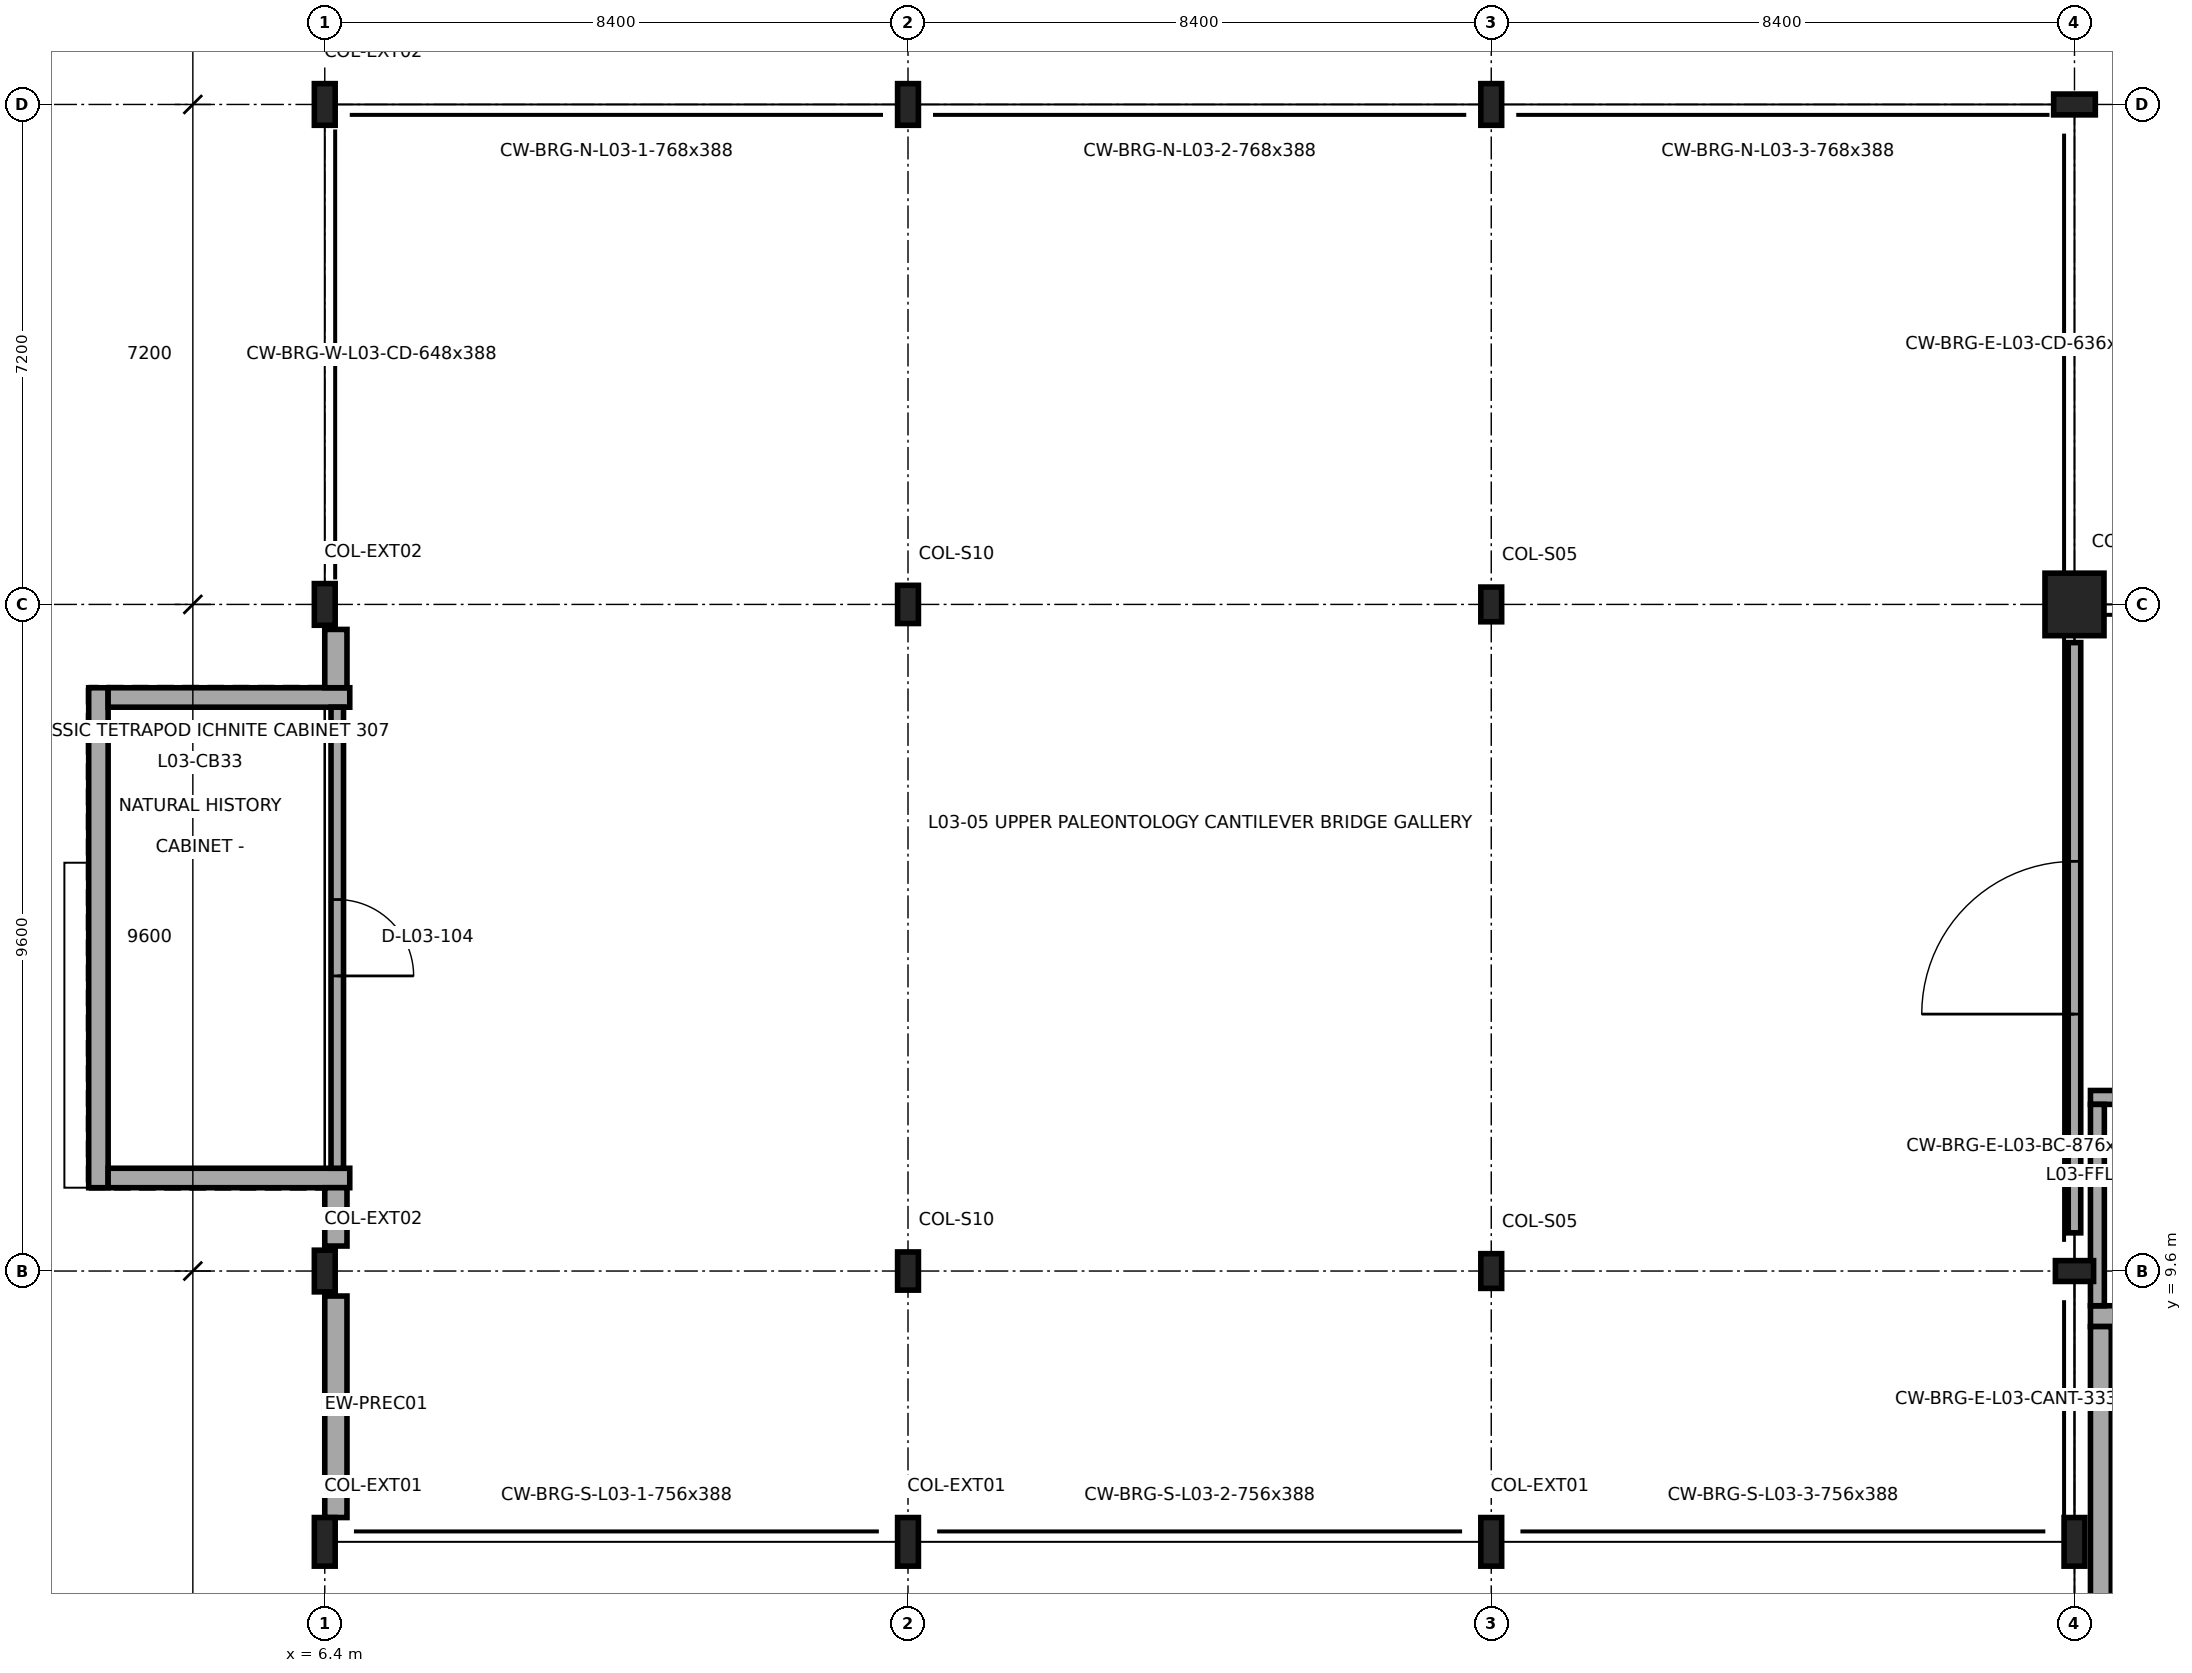
"""IFC4 building model, lengths in metres.
Left out: names, types, materials, properties, quantities, classifications, styles, units other than length and angle.
Written with IfcOpenShell. Run it as: python <this file> out.ifc"""

import sys

from ifc_helpers import new_model, si_unit, direction, frame, frame_2d, origin, origin_2d, place, context, subcontext, project, spatial, rectangle, i_section, extrude, element, fill, save


model = new_model("IFC4")
c1 = context("Model", 3, precision=1e-05, world=origin(), true_north=direction((0.0, 1.0)))
c2 = subcontext(c1, "Body", "Model", "MODEL_VIEW")
j1 = project(units=[si_unit("LENGTHUNIT", "METRE"), si_unit("PLANEANGLEUNIT", "RADIAN")], contexts=[c1])
p1 = place(None, origin())
s1 = spatial("IfcSite", under=j1, at=p1, CompositionType="ELEMENT")
p2 = place(p1, origin())
s2 = spatial("IfcBuilding", under=s1, at=p2, CompositionType="ELEMENT")
p3 = place(p2, frame((0.0, 0.0, 17.4)))
s3 = spatial("IfcBuildingStorey", under=s2, at=p3, CompositionType="ELEMENT", Elevation=17.4)
for number, where, z_axis, x_axis in (
    (1, (6.4, 9.6, 0.0), (0.0, 0.0, 1.0), (1.0, 0.0, 0.0)),
    (2, (6.4, 19.2, 0.0), (0.0, 0.0, 1.0), (1.0, 0.0, 0.0)),
    (3, (6.4, 26.4, 0.0), (0.0, 0.0, 1.0), (1.0, 0.0, 0.0)),
):
    element("IfcColumn", number, at=place(p3, frame(where, z_axis=z_axis, x_axis=x_axis)), inside=s3, PredefinedType="COLUMN", context=c2, shape_type="SweptSolid", body=[
        extrude(i_section(OverallWidth=0.3, OverallDepth=0.6, WebThickness=0.015, FlangeThickness=0.03, FilletRadius=0.027, at=origin_2d()), origin(), (0.0, 0.0, 1.0), 4.5),
    ])
for number, where, z_axis, x_axis in (
    (4, (14.8, 9.6, 0.0), (0.0, 0.0, 1.0), (1.0, 0.0, 0.0)),
    (5, (14.8, 19.2, 0.0), (0.0, 0.0, 1.0), (1.0, 0.0, 0.0)),
):
    element("IfcColumn", number, at=place(p3, frame(where, z_axis=z_axis, x_axis=x_axis)), inside=s3, PredefinedType="COLUMN", context=c2, shape_type="SweptSolid", body=[
        extrude(i_section(OverallWidth=0.3, OverallDepth=0.55, WebThickness=0.015, FlangeThickness=0.029, FilletRadius=0.027, at=origin_2d()), origin(), (0.0, 0.0, 1.0), 4.5),
    ])
p4 = place(p3, frame((14.8, 26.4, 0.0), z_axis=(0.0, 0.0, 1.0), x_axis=(1.0, 0.0, 0.0)))
e6 = element("IfcColumn", 6, at=p4, inside=s3, PredefinedType="COLUMN", context=c2, shape_type="SweptSolid", body=[
    extrude(i_section(OverallWidth=0.3, OverallDepth=0.6, WebThickness=0.015, FlangeThickness=0.03, FilletRadius=0.027, at=origin_2d()), origin(), (0.0, 0.0, 1.0), 4.5),
])
for number, where, z_axis, x_axis in (
    (7, (23.2, 9.6, 0.0), (0.0, 0.0, 1.0), (1.0, 0.0, 0.0)),
    (8, (23.2, 19.2, 0.0), (0.0, 0.0, 1.0), (1.0, 0.0, 0.0)),
):
    element("IfcColumn", number, at=place(p3, frame(where, z_axis=z_axis, x_axis=x_axis)), inside=s3, PredefinedType="COLUMN", context=c2, shape_type="SweptSolid", body=[
        extrude(i_section(OverallWidth=0.3, OverallDepth=0.5, WebThickness=0.014, FlangeThickness=0.028, FilletRadius=0.027, at=origin_2d()), origin(), (0.0, 0.0, 1.0), 4.5),
    ])
p5 = place(p3, frame((23.2, 26.4, 0.0), z_axis=(0.0, 0.0, 1.0), x_axis=(1.0, 0.0, 0.0)))
e9 = element("IfcColumn", 9, at=p5, inside=s3, PredefinedType="COLUMN", context=c2, shape_type="SweptSolid", body=[
    extrude(i_section(OverallWidth=0.3, OverallDepth=0.6, WebThickness=0.015, FlangeThickness=0.03, FilletRadius=0.027, at=origin_2d()), origin(), (0.0, 0.0, 1.0), 4.5),
])
p6 = place(p3, frame((31.6, 9.6, 0.0), z_axis=(0.0, 0.0, 1.0), x_axis=(0.0, 1.0, 0.0)))
e10 = element("IfcColumn", 10, at=p6, inside=s3, PredefinedType="COLUMN", context=c2, shape_type="SweptSolid", body=[
    extrude(i_section(OverallWidth=0.3, OverallDepth=0.55, WebThickness=0.015, FlangeThickness=0.029, FilletRadius=0.027, at=origin_2d()), origin(), (0.0, 0.0, 1.0), 4.5),
])
p7 = place(p3, frame((31.6, 19.2, 0.0), z_axis=(0.0, 0.0, 1.0), x_axis=(1.0, 0.0, 0.0)))
e11 = element("IfcColumn", 11, at=p7, inside=s3, PredefinedType="COLUMN", context=c2, shape_type="SweptSolid", body=[
    extrude(rectangle(XDim=0.85, YDim=0.9, at=origin_2d()), origin(), (0.0, 0.0, 1.0), 4.5),
])
p8 = place(p3, frame((31.6, 26.4, 0.0), z_axis=(0.0, 0.0, 1.0), x_axis=(0.0, 1.0, 0.0)))
e12 = element("IfcColumn", 12, at=p8, inside=s3, PredefinedType="COLUMN", context=c2, shape_type="SweptSolid", body=[
    extrude(i_section(OverallWidth=0.3, OverallDepth=0.6, WebThickness=0.015, FlangeThickness=0.03, FilletRadius=0.027, at=origin_2d()), origin(), (0.0, 0.0, 1.0), 4.5),
])
for number, where, z_axis, x_axis in (
    (13, (6.4, 5.7, 0.0), (0.0, 0.0, 1.0), (1.0, 0.0, 0.0)),
    (14, (14.8, 5.7, 0.0), (0.0, 0.0, 1.0), (1.0, 0.0, 0.0)),
    (15, (23.2, 5.7, 0.0), (0.0, 0.0, 1.0), (1.0, 0.0, 0.0)),
    (16, (31.6, 5.7, 0.0), (0.0, 0.0, 1.0), (1.0, 0.0, 0.0)),
):
    element("IfcColumn", number, at=place(p3, frame(where, z_axis=z_axis, x_axis=x_axis)), inside=s3, PredefinedType="COLUMN", context=c2, shape_type="SweptSolid", body=[
        extrude(i_section(OverallWidth=0.3, OverallDepth=0.7, WebThickness=0.017, FlangeThickness=0.032, FilletRadius=0.027, at=origin_2d()), origin(), (0.0, 0.0, 1.0), 4.5),
    ])
p9 = place(p3, frame((3.14, 18.0, 0.0), z_axis=(0.0, 0.0, 1.0), x_axis=(0.0, -1.0, 0.0)))
e17 = element("IfcWall", 17, at=p9, inside=s3, PredefinedType="SOLIDWALL", context=c2, shape_type="SweptSolid", body=[
    extrude(rectangle(XDim=7.2, YDim=0.28, at=frame_2d((3.6, 0.0))), origin(), (0.0, 0.0, 1.0), 2.99),
])
for number, where, z_axis, x_axis in (
    (18, (3.28, 10.94, 0.0), (0.0, 0.0, 1.0), (1.0, 0.0, 0.0)),
    (19, (6.76, 17.86, 0.0), (0.0, 0.0, 1.0), (-1.0, 0.0, 0.0)),
):
    element("IfcWall", number, at=place(p3, frame(where, z_axis=z_axis, x_axis=x_axis)), inside=s3, PredefinedType="SOLIDWALL", context=c2, shape_type="SweptSolid", body=[
        extrude(rectangle(XDim=3.48, YDim=0.28, at=frame_2d((1.74, 0.0))), origin(), (0.0, 0.0, 1.0), 2.99),
    ])
p10 = place(p3, frame((6.56, 9.24, 0.0), z_axis=(0.0, 0.0, 1.0), x_axis=(0.0, -1.0, 0.0)))
e20 = element("IfcWall", 20, at=p10, inside=s3, PredefinedType="SOLIDWALL", context=c2, shape_type="SweptSolid", body=[
    extrude(rectangle(XDim=3.19, YDim=0.32, at=frame_2d((1.595, 0.0))), origin(), (0.0, 0.0, 1.0), 3.532),
])
for number, where, z_axis, x_axis in (
    (21, (6.56, 10.8, 0.0), (0.0, 0.0, 1.0), (0.0, -1.0, 0.0)),
    (22, (6.56, 18.84, 0.0), (0.0, 0.0, 1.0), (0.0, -1.0, 0.0)),
):
    element("IfcWall", number, at=place(p3, frame(where, z_axis=z_axis, x_axis=x_axis)), inside=s3, PredefinedType="SOLIDWALL", context=c2, shape_type="SweptSolid", body=[
        extrude(rectangle(XDim=0.84, YDim=0.32, at=frame_2d((0.42, 0.0))), origin(), (0.0, 0.0, 1.0), 2.992),
    ])
p11 = place(p3, frame((39.77, 8.95, 0.0), z_axis=(0.0, 0.0, 1.0), x_axis=(-1.0, 0.0, 0.0)))
e23 = element("IfcWall", 23, at=p11, inside=s3, PredefinedType="SHEAR", context=c2, shape_type="SweptSolid", body=[
    extrude(rectangle(XDim=7.94, YDim=0.3, at=frame_2d((3.97, 0.0))), origin(), (0.0, 0.0, 1.0), 4.25),
])
p12 = place(p11, frame((5.17, 0.0, 0.0)))
e24 = element("IfcOpeningElement", 24, at=p12, cuts=e23, PredefinedType="OPENING", context=c2, shape_type="SweptSolid", body=[
    extrude(rectangle(XDim=1.1, YDim=2.2, at=frame_2d((0.55, 1.1))), frame((0.0, 0.16, 0.0), z_axis=(0.0, -1.0, 0.0), x_axis=(1.0, 0.0, 0.0)), (0.0, 0.0, 1.0), 0.32),
])
p13 = place(p11, frame((2.09, 0.0, 0.0)))
e25 = element("IfcOpeningElement", 25, at=p13, cuts=e23, PredefinedType="OPENING", context=c2, shape_type="SweptSolid", body=[
    extrude(rectangle(XDim=1.1, YDim=2.1, at=frame_2d((0.55, 1.05))), frame((0.0, 0.16, 0.0), z_axis=(0.0, -1.0, 0.0), x_axis=(1.0, 0.0, 0.0)), (0.0, 0.0, 1.0), 0.32),
])
p14 = place(p11, frame((0.365, 0.0, 0.0)))
e26 = element("IfcOpeningElement", 26, at=p14, cuts=e23, PredefinedType="OPENING", context=c2, shape_type="SweptSolid", body=[
    extrude(rectangle(XDim=1.1, YDim=2.1, at=frame_2d((0.55, 1.05))), frame((0.0, 0.16, 0.0), z_axis=(0.0, -1.0, 0.0), x_axis=(1.0, 0.0, 0.0)), (0.0, 0.0, 1.0), 0.32),
])
p15 = place(p3, frame((31.98, 8.8, 0.0), z_axis=(0.0, 0.0, 1.0), x_axis=(0.0, -1.0, 0.0)))
e27 = element("IfcWall", 27, at=p15, inside=s3, PredefinedType="SHEAR", context=c2, shape_type="SweptSolid", body=[
    extrude(rectangle(XDim=8.0, YDim=0.3, at=frame_2d((4.0, 0.0))), origin(), (0.0, 0.0, 1.0), 4.25),
])
p16 = place(p3, frame((31.83, 12.1, 0.0), z_axis=(0.0, 0.0, 1.0), x_axis=(1.0, 0.0, 0.0)))
e28 = element("IfcWall", 28, at=p16, inside=s3, PredefinedType="SOLIDWALL", context=c2, shape_type="SweptSolid", body=[
    extrude(rectangle(XDim=7.94, YDim=0.2, at=frame_2d((3.97, 0.0))), origin(), (0.0, 0.0, 1.0), 3.532),
])
p17 = place(p16, frame((3.07, 0.0, 0.0)))
e29 = element("IfcOpeningElement", 29, at=p17, cuts=e28, PredefinedType="OPENING", context=c2, shape_type="SweptSolid", body=[
    extrude(rectangle(XDim=1.8, YDim=2.2, at=frame_2d((0.9, 1.1))), frame((0.0, 0.11, 0.0), z_axis=(0.0, -1.0, 0.0), x_axis=(1.0, 0.0, 0.0)), (0.0, 0.0, 1.0), 0.22),
])
p18 = place(p3, frame((31.93, 9.1, 0.0), z_axis=(0.0, 0.0, 1.0), x_axis=(0.0, 1.0, 0.0)))
e30 = element("IfcWall", 30, at=p18, inside=s3, PredefinedType="SOLIDWALL", context=c2, shape_type="SweptSolid", body=[
    extrude(rectangle(XDim=2.9, YDim=0.2, at=frame_2d((1.45, 0.0))), origin(), (0.0, 0.0, 1.0), 3.732),
])
p19 = place(p3, frame((6.58, 11.08, 0.0), z_axis=(0.0, 0.0, 1.0), x_axis=(0.0, 1.0, 0.0)))
e31 = element("IfcWall", 31, at=p19, inside=s3, PredefinedType="PARTITIONING", context=c2, shape_type="SweptSolid", body=[
    extrude(rectangle(XDim=6.64, YDim=0.18, at=frame_2d((3.32, 0.0))), origin(), (0.0, 0.0, 1.0), 2.99),
])
p20 = place(p19, frame((2.77, 0.0, 0.0)))
e32 = element("IfcOpeningElement", 32, at=p20, cuts=e31, PredefinedType="OPENING", context=c2, shape_type="SweptSolid", body=[
    extrude(rectangle(XDim=1.1, YDim=2.2, at=frame_2d((0.55, 1.1))), frame((0.0, 0.1, 0.0), z_axis=(0.0, -1.0, 0.0), x_axis=(1.0, 0.0, 0.0)), (0.0, 0.0, 1.0), 0.2),
])
p21 = place(p3, frame((31.6, 10.15, 0.0), z_axis=(0.0, 0.0, 1.0), x_axis=(0.0, 1.0, 0.0)))
e33 = element("IfcWall", 33, at=p21, inside=s3, PredefinedType="PARTITIONING", context=c2, shape_type="SweptSolid", body=[
    extrude(rectangle(XDim=8.5, YDim=0.18, at=frame_2d((4.25, 0.0))), origin(), (0.0, 0.0, 1.0), 3.532),
])
p22 = place(p21, frame((3.15, 0.0, 0.0)))
e34 = element("IfcOpeningElement", 34, at=p22, cuts=e33, PredefinedType="OPENING", context=c2, shape_type="SweptSolid", body=[
    extrude(rectangle(XDim=2.2, YDim=2.6, at=frame_2d((1.1, 1.3))), frame((0.0, 0.1, 0.0), z_axis=(0.0, -1.0, 0.0), x_axis=(1.0, 0.0, 0.0)), (0.0, 0.0, 1.0), 0.2),
])
p23 = place(p20, origin())
e35 = element("IfcDoor", 35, at=p23, inside=s3, OperationType="SINGLE_SWING_RIGHT", PredefinedType="DOOR", context=c2, shape_type="SweptSolid", body=[
    extrude(rectangle(XDim=1.1, YDim=2.2, at=frame_2d((0.55, 1.1))), frame((0.0, 0.025, 0.0), z_axis=(0.0, -1.0, 0.0), x_axis=(1.0, 0.0, 0.0)), (0.0, 0.0, 1.0), 0.05),
])
fill(e32, e35)
p24 = place(p22, origin())
e36 = element("IfcDoor", 36, at=p24, inside=s3, OperationType="DOUBLE_DOOR_SINGLE_SWING", PredefinedType="DOOR", context=c2, shape_type="SweptSolid", body=[
    extrude(rectangle(XDim=2.2, YDim=2.6, at=frame_2d((1.1, 1.3))), frame((0.0, 0.025, 0.0), z_axis=(0.0, -1.0, 0.0), x_axis=(1.0, 0.0, 0.0)), (0.0, 0.0, 1.0), 0.05),
])
fill(e34, e36)
save(model, sys.argv[1])
